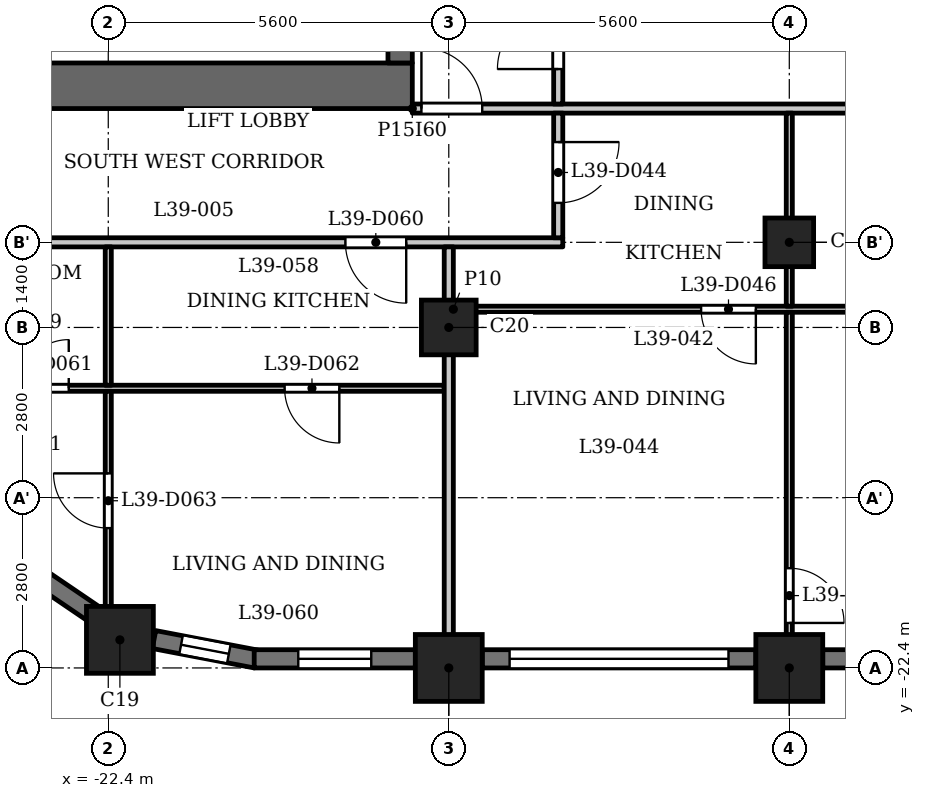
"""IFC4 building model, lengths in metres.
Left out: names, types, materials, properties, quantities, classifications, styles, units other than length and angle.
Written with IfcOpenShell. Run it as: python <this file> out.ifc"""

import sys

from ifc_helpers import new_model, si_unit, direction, frame, frame_2d, origin, origin_2d, place, context, subcontext, project, spatial, rectangle, extrude, element, fill, save


model = new_model("IFC4")
c1 = context("Model", 3, precision=1e-05, world=origin(), true_north=direction((0.0, 1.0)))
c2 = subcontext(c1, "Body", "Model", "MODEL_VIEW")
j1 = project(units=[si_unit("LENGTHUNIT", "METRE"), si_unit("PLANEANGLEUNIT", "RADIAN")], contexts=[c1])
p1 = place(None, origin())
s1 = spatial("IfcSite", under=j1, at=p1, CompositionType="ELEMENT")
p2 = place(p1, origin())
s2 = spatial("IfcBuilding", under=s1, at=p2, CompositionType="ELEMENT")
p3 = place(p2, frame((0.0, 0.0, 153.6)))
s3 = spatial("IfcBuildingStorey", under=s2, at=p3, CompositionType="ELEMENT", Elevation=153.6)
for number, where, z_axis, x_axis in (
    (1, (-22.209, -21.938, 0.0), (0.0, 0.0, 1.0), (1.0, 0.0, 0.0)),
    (2, (-16.8, -22.4, 0.0), (0.0, 0.0, 1.0), (1.0, 0.0, 0.0)),
    (3, (-11.2, -22.4, 0.0), (0.0, 0.0, 1.0), (1.0, 0.0, 0.0)),
):
    element("IfcColumn", number, at=place(p3, frame(where, z_axis=z_axis, x_axis=x_axis)), inside=s3, PredefinedType="COLUMN", context=c2, shape_type="SweptSolid", body=[
        extrude(rectangle(XDim=1.1, YDim=1.1, at=origin_2d()), origin(), (0.0, 0.0, 1.0), 3.5),
    ])
p4 = place(p3, frame((-16.8, -16.8, 0.0), z_axis=(0.0, 0.0, 1.0), x_axis=(1.0, 0.0, 0.0)))
e4 = element("IfcColumn", 4, at=p4, inside=s3, PredefinedType="COLUMN", context=c2, shape_type="SweptSolid", body=[
    extrude(rectangle(XDim=0.9, YDim=0.9, at=origin_2d()), origin(), (0.0, 0.0, 1.0), 3.5),
])
p5 = place(p3, frame((-11.2, -15.4, 0.0), z_axis=(0.0, 0.0, 1.0), x_axis=(1.0, 0.0, 0.0)))
e5 = element("IfcColumn", 5, at=p5, inside=s3, PredefinedType="COLUMN", context=c2, shape_type="SweptSolid", body=[
    extrude(rectangle(XDim=0.8, YDim=0.8, at=origin_2d()), origin(), (0.0, 0.0, 1.0), 3.5),
])
p6 = place(p3, frame((-23.492, -20.932, 0.0), z_axis=(0.0, 0.0, 1.0), x_axis=(0.826993959827, -0.562210806023, 0.0)))
e6 = element("IfcWall", 6, at=p6, inside=s3, PredefinedType="SOLIDWALL", context=c2, shape_type="SweptSolid", body=[
    extrude(rectangle(XDim=1.077, YDim=0.3, at=frame_2d((0.539, 0.0))), origin(), (0.0, 0.0, 1.0), 3.2),
])
p7 = place(p3, frame((-21.648, -21.933, 0.0), z_axis=(0.0, 0.0, 1.0), x_axis=(0.982297206936, -0.187329114784, 0.0)))
e7 = element("IfcWall", 7, at=p7, inside=s3, PredefinedType="SOLIDWALL", context=c2, shape_type="SweptSolid", body=[
    extrude(rectangle(XDim=1.706, YDim=0.3, at=frame_2d((0.853, 0.0))), origin(), (0.0, 0.0, 1.0), 2.45),
])
p8 = place(p7, frame((0.453, 0.0, 0.6)))
e8 = element("IfcOpeningElement", 8, at=p8, cuts=e7, PredefinedType="OPENING", context=c2, shape_type="SweptSolid", body=[
    extrude(rectangle(XDim=0.8, YDim=1.55, at=frame_2d((0.4, 0.775))), frame((0.0, 0.16, 0.0), z_axis=(0.0, -1.0, 0.0), x_axis=(1.0, 0.0, 0.0)), (0.0, 0.0, 1.0), 0.32),
])
p9 = place(p3, frame((-20.0, -22.25, 0.0), z_axis=(0.0, 0.0, 1.0), x_axis=(1.0, 0.0, 0.0)))
e9 = element("IfcWall", 9, at=p9, inside=s3, PredefinedType="SOLIDWALL", context=c2, shape_type="SweptSolid", body=[
    extrude(rectangle(XDim=2.65, YDim=0.3, at=frame_2d((1.325, 0.0))), origin(), (0.0, 0.0, 1.0), 2.45),
])
p10 = place(p9, frame((0.725, 0.0, 0.6)))
e10 = element("IfcOpeningElement", 10, at=p10, cuts=e9, PredefinedType="OPENING", context=c2, shape_type="SweptSolid", body=[
    extrude(rectangle(XDim=1.2, YDim=1.55, at=frame_2d((0.6, 0.775))), frame((0.0, 0.16, 0.0), z_axis=(0.0, -1.0, 0.0), x_axis=(1.0, 0.0, 0.0)), (0.0, 0.0, 1.0), 0.32),
])
p11 = place(p3, frame((-16.25, -22.25, 0.0), z_axis=(0.0, 0.0, 1.0), x_axis=(1.0, 0.0, 0.0)))
e11 = element("IfcWall", 11, at=p11, inside=s3, PredefinedType="SOLIDWALL", context=c2, shape_type="SweptSolid", body=[
    extrude(rectangle(XDim=4.5, YDim=0.3, at=frame_2d((2.25, 0.0))), origin(), (0.0, 0.0, 1.0), 2.45),
])
p12 = place(p11, frame((0.45, 0.0, 1.2)))
e12 = element("IfcOpeningElement", 12, at=p12, cuts=e11, PredefinedType="OPENING", context=c2, shape_type="SweptSolid", body=[
    extrude(rectangle(XDim=3.6, YDim=0.95, at=frame_2d((1.8, 0.475))), frame((0.0, 0.16, 0.0), z_axis=(0.0, -1.0, 0.0), x_axis=(1.0, 0.0, 0.0)), (0.0, 0.0, 1.0), 0.32),
])
p13 = place(p3, frame((-10.65, -22.25, 0.0), z_axis=(0.0, 0.0, 1.0), x_axis=(1.0, 0.0, 0.0)))
e13 = element("IfcWall", 13, at=p13, inside=s3, PredefinedType="SOLIDWALL", context=c2, shape_type="SweptSolid", body=[
    extrude(rectangle(XDim=4.5, YDim=0.3, at=frame_2d((2.25, 0.0))), origin(), (0.0, 0.0, 1.0), 2.45),
])
p14 = place(p13, frame((0.45, 0.0, 1.2)))
e14 = element("IfcOpeningElement", 14, at=p14, cuts=e13, PredefinedType="OPENING", context=c2, shape_type="SweptSolid", body=[
    extrude(rectangle(XDim=3.6, YDim=0.95, at=frame_2d((1.8, 0.475))), frame((0.0, 0.16, 0.0), z_axis=(0.0, -1.0, 0.0), x_axis=(1.0, 0.0, 0.0)), (0.0, 0.0, 1.0), 0.32),
])
p15 = place(p3, frame((-17.4, -12.825, 0.0), z_axis=(0.0, 0.0, 1.0), x_axis=(-1.0, 0.0, 0.0)))
e15 = element("IfcWall", 15, at=p15, inside=s3, PredefinedType="SHEAR", context=c2, shape_type="SweptSolid", body=[
    extrude(rectangle(XDim=10.4, YDim=0.75, at=frame_2d((5.2, 0.0))), origin(), (0.0, 0.0, 1.0), 3.2),
])
p16 = place(p3, frame((-17.6, -12.45, 0.0), z_axis=(0.0, 0.0, 1.0), x_axis=(0.0, 1.0, 0.0)))
e16 = element("IfcWall", 16, at=p16, inside=s3, PredefinedType="SHEAR", context=c2, shape_type="SweptSolid", body=[
    extrude(rectangle(XDim=24.9, YDim=0.4, at=frame_2d((12.45, 0.0))), origin(), (0.0, 0.0, 1.0), 3.2),
])
p17 = place(p16, frame((6.325, 0.0, 0.0)))
e17 = element("IfcOpeningElement", 17, at=p17, cuts=e16, PredefinedType="OPENING", context=c2, shape_type="SweptSolid", body=[
    extrude(rectangle(XDim=0.9, YDim=2.1, at=frame_2d((0.45, 1.05))), frame((0.0, 0.21, 0.0), z_axis=(0.0, -1.0, 0.0), x_axis=(1.0, 0.0, 0.0)), (0.0, 0.0, 1.0), 0.42),
])
p18 = place(p16, frame((9.925, 0.0, 0.0)))
e18 = element("IfcOpeningElement", 18, at=p18, cuts=e16, PredefinedType="OPENING", context=c2, shape_type="SweptSolid", body=[
    extrude(rectangle(XDim=0.9, YDim=2.1, at=frame_2d((0.45, 1.05))), frame((0.0, 0.21, 0.0), z_axis=(0.0, -1.0, 0.0), x_axis=(1.0, 0.0, 0.0)), (0.0, 0.0, 1.0), 0.42),
])
p19 = place(p16, frame((15.6, 0.0, 0.0)))
e19 = element("IfcOpeningElement", 19, at=p19, cuts=e16, PredefinedType="OPENING", context=c2, shape_type="SweptSolid", body=[
    extrude(rectangle(XDim=1.1, YDim=2.1, at=frame_2d((0.55, 1.05))), frame((0.0, 0.21, 0.0), z_axis=(0.0, -1.0, 0.0), x_axis=(1.0, 0.0, 0.0)), (0.0, 0.0, 1.0), 0.42),
])
p20 = place(p16, frame((18.0, 0.0, 0.0)))
e20 = element("IfcOpeningElement", 20, at=p20, cuts=e16, PredefinedType="OPENING", context=c2, shape_type="SweptSolid", body=[
    extrude(rectangle(XDim=1.1, YDim=2.1, at=frame_2d((0.55, 1.05))), frame((0.0, 0.21, 0.0), z_axis=(0.0, -1.0, 0.0), x_axis=(1.0, 0.0, 0.0)), (0.0, 0.0, 1.0), 0.42),
])
p21 = place(p16, frame((23.025, 0.0, 0.0)))
e21 = element("IfcOpeningElement", 21, at=p21, cuts=e16, PredefinedType="OPENING", context=c2, shape_type="SweptSolid", body=[
    extrude(rectangle(XDim=1.1, YDim=2.1, at=frame_2d((0.55, 1.05))), frame((0.0, 0.21, 0.0), z_axis=(0.0, -1.0, 0.0), x_axis=(1.0, 0.0, 0.0)), (0.0, 0.0, 1.0), 0.42),
])
p22 = place(p16, frame((0.775, 0.0, 0.0)))
e22 = element("IfcOpeningElement", 22, at=p22, cuts=e16, PredefinedType="OPENING", context=c2, shape_type="SweptSolid", body=[
    extrude(rectangle(XDim=1.1, YDim=2.1, at=frame_2d((0.55, 1.05))), frame((0.0, 0.21, 0.0), z_axis=(0.0, -1.0, 0.0), x_axis=(1.0, 0.0, 0.0)), (0.0, 0.0, 1.0), 0.42),
])
p23 = place(p16, frame((12.925, 0.0, 0.0)))
e23 = element("IfcOpeningElement", 23, at=p23, cuts=e16, PredefinedType="OPENING", context=c2, shape_type="SweptSolid", body=[
    extrude(rectangle(XDim=1.8, YDim=2.1, at=frame_2d((0.9, 1.05))), frame((0.0, 0.21, 0.0), z_axis=(0.0, -1.0, 0.0), x_axis=(1.0, 0.0, 0.0)), (0.0, 0.0, 1.0), 0.42),
])
p24 = place(p3, frame((-26.394, -17.8, 0.0), z_axis=(0.0, 0.0, 1.0), x_axis=(1.0, 0.0, 0.0)))
e24 = element("IfcWall", 24, at=p24, inside=s3, PredefinedType="PARTITIONING", context=c2, shape_type="SweptSolid", body=[
    extrude(rectangle(XDim=9.519, YDim=0.1, at=frame_2d((4.76, 0.0))), origin(), (0.0, 0.0, 1.0), 3.2),
])
p25 = place(p24, frame((2.544, 0.0, 0.0)))
e25 = element("IfcOpeningElement", 25, at=p25, cuts=e24, PredefinedType="OPENING", context=c2, shape_type="SweptSolid", body=[
    extrude(rectangle(XDim=0.8, YDim=2.1, at=frame_2d((0.4, 1.05))), frame((0.0, 0.06, 0.0), z_axis=(0.0, -1.0, 0.0), x_axis=(1.0, 0.0, 0.0)), (0.0, 0.0, 1.0), 0.12),
])
p26 = place(p24, frame((6.894, 0.0, 0.0)))
e26 = element("IfcOpeningElement", 26, at=p26, cuts=e24, PredefinedType="OPENING", context=c2, shape_type="SweptSolid", body=[
    extrude(rectangle(XDim=0.9, YDim=2.1, at=frame_2d((0.45, 1.05))), frame((0.0, 0.06, 0.0), z_axis=(0.0, -1.0, 0.0), x_axis=(1.0, 0.0, 0.0)), (0.0, 0.0, 1.0), 0.12),
])
p27 = place(p3, frame((-16.725, -16.5, 0.0), z_axis=(0.0, 0.0, 1.0), x_axis=(1.0, 0.0, 0.0)))
e27 = element("IfcWall", 27, at=p27, inside=s3, PredefinedType="PARTITIONING", context=c2, shape_type="SweptSolid", body=[
    extrude(rectangle(XDim=33.45, YDim=0.1, at=frame_2d((16.725, 0.0))), origin(), (0.0, 0.0, 1.0), 3.2),
])
p28 = place(p27, frame((9.675, 0.0, 0.0)))
e28 = element("IfcOpeningElement", 28, at=p28, cuts=e27, PredefinedType="OPENING", context=c2, shape_type="SweptSolid", body=[
    extrude(rectangle(XDim=0.8, YDim=2.1, at=frame_2d((0.4, 1.05))), frame((0.0, 0.06, 0.0), z_axis=(0.0, -1.0, 0.0), x_axis=(1.0, 0.0, 0.0)), (0.0, 0.0, 1.0), 0.12),
])
p29 = place(p27, frame((4.075, 0.0, 0.0)))
e29 = element("IfcOpeningElement", 29, at=p29, cuts=e27, PredefinedType="OPENING", context=c2, shape_type="SweptSolid", body=[
    extrude(rectangle(XDim=0.9, YDim=2.1, at=frame_2d((0.45, 1.05))), frame((0.0, 0.06, 0.0), z_axis=(0.0, -1.0, 0.0), x_axis=(1.0, 0.0, 0.0)), (0.0, 0.0, 1.0), 0.12),
])
p30 = place(p27, frame((20.875, 0.0, 0.0)))
e30 = element("IfcOpeningElement", 30, at=p30, cuts=e27, PredefinedType="OPENING", context=c2, shape_type="SweptSolid", body=[
    extrude(rectangle(XDim=0.8, YDim=2.1, at=frame_2d((0.4, 1.05))), frame((0.0, 0.06, 0.0), z_axis=(0.0, -1.0, 0.0), x_axis=(1.0, 0.0, 0.0)), (0.0, 0.0, 1.0), 0.12),
])
p31 = place(p27, frame((15.275, 0.0, 0.0)))
e31 = element("IfcOpeningElement", 31, at=p31, cuts=e27, PredefinedType="OPENING", context=c2, shape_type="SweptSolid", body=[
    extrude(rectangle(XDim=0.9, YDim=2.1, at=frame_2d((0.45, 1.05))), frame((0.0, 0.06, 0.0), z_axis=(0.0, -1.0, 0.0), x_axis=(1.0, 0.0, 0.0)), (0.0, 0.0, 1.0), 0.12),
])
p32 = place(p27, frame((26.475, 0.0, 0.0)))
e32 = element("IfcOpeningElement", 32, at=p32, cuts=e27, PredefinedType="OPENING", context=c2, shape_type="SweptSolid", body=[
    extrude(rectangle(XDim=0.8, YDim=2.1, at=frame_2d((0.4, 1.05))), frame((0.0, 0.06, 0.0), z_axis=(0.0, -1.0, 0.0), x_axis=(1.0, 0.0, 0.0)), (0.0, 0.0, 1.0), 0.12),
])
p33 = place(p27, frame((30.575, 0.0, 0.0)))
e33 = element("IfcOpeningElement", 33, at=p33, cuts=e27, PredefinedType="OPENING", context=c2, shape_type="SweptSolid", body=[
    extrude(rectangle(XDim=0.9, YDim=2.1, at=frame_2d((0.45, 1.05))), frame((0.0, 0.06, 0.0), z_axis=(0.0, -1.0, 0.0), x_axis=(1.0, 0.0, 0.0)), (0.0, 0.0, 1.0), 0.12),
])
p34 = place(p3, frame((-27.484, -15.4, 0.0), z_axis=(0.0, 0.0, 1.0), x_axis=(1.0, 0.0, 0.0)))
e34 = element("IfcWall", 34, at=p34, inside=s3, PredefinedType="PARTITIONING", context=c2, shape_type="SweptSolid", body=[
    extrude(rectangle(XDim=12.559, YDim=0.15, at=frame_2d((6.279, 0.0))), origin(), (0.0, 0.0, 1.0), 3.2),
])
p35 = place(p34, frame((8.984, 0.0, 0.0)))
e35 = element("IfcOpeningElement", 35, at=p35, cuts=e34, PredefinedType="OPENING", context=c2, shape_type="SweptSolid", body=[
    extrude(rectangle(XDim=1.0, YDim=2.1, at=frame_2d((0.5, 1.05))), frame((0.0, 0.085, 0.0), z_axis=(0.0, -1.0, 0.0), x_axis=(1.0, 0.0, 0.0)), (0.0, 0.0, 1.0), 0.17),
])
p36 = place(p3, frame((-17.4, -13.2, 0.0), z_axis=(0.0, 0.0, 1.0), x_axis=(1.0, 0.0, 0.0)))
e36 = element("IfcWall", 36, at=p36, inside=s3, PredefinedType="PARTITIONING", context=c2, shape_type="SweptSolid", body=[
    extrude(rectangle(XDim=34.8, YDim=0.15, at=frame_2d((17.4, 0.0))), origin(), (0.0, 0.0, 1.0), 3.2),
])
p37 = place(p36, frame((0.15, 0.0, 0.0)))
e37 = element("IfcOpeningElement", 37, at=p37, cuts=e36, PredefinedType="OPENING", context=c2, shape_type="SweptSolid", body=[
    extrude(rectangle(XDim=1.0, YDim=2.1, at=frame_2d((0.5, 1.05))), frame((0.0, 0.085, 0.0), z_axis=(0.0, -1.0, 0.0), x_axis=(1.0, 0.0, 0.0)), (0.0, 0.0, 1.0), 0.17),
])
p38 = place(p36, frame((33.55, 0.0, 0.0)))
e38 = element("IfcOpeningElement", 38, at=p38, cuts=e36, PredefinedType="OPENING", context=c2, shape_type="SweptSolid", body=[
    extrude(rectangle(XDim=1.0, YDim=2.1, at=frame_2d((0.5, 1.05))), frame((0.0, 0.085, 0.0), z_axis=(0.0, -1.0, 0.0), x_axis=(1.0, 0.0, 0.0)), (0.0, 0.0, 1.0), 0.17),
])
p39 = place(p36, frame((15.7, 0.0, 0.0)))
e39 = element("IfcOpeningElement", 39, at=p39, cuts=e36, PredefinedType="OPENING", context=c2, shape_type="SweptSolid", body=[
    extrude(rectangle(XDim=1.0, YDim=2.1, at=frame_2d((0.5, 1.05))), frame((0.0, 0.085, 0.0), z_axis=(0.0, -1.0, 0.0), x_axis=(1.0, 0.0, 0.0)), (0.0, 0.0, 1.0), 0.17),
])
p40 = place(p3, frame((-22.4, -21.72, 0.0), z_axis=(0.0, 0.0, 1.0), x_axis=(0.0, 1.0, 0.0)))
e40 = element("IfcWall", 40, at=p40, inside=s3, PredefinedType="PARTITIONING", context=c2, shape_type="SweptSolid", body=[
    extrude(rectangle(XDim=3.87, YDim=0.1, at=frame_2d((1.935, 0.0))), origin(), (0.0, 0.0, 1.0), 3.2),
])
p41 = place(p40, frame((1.62, 0.0, 0.0)))
e41 = element("IfcOpeningElement", 41, at=p41, cuts=e40, PredefinedType="OPENING", context=c2, shape_type="SweptSolid", body=[
    extrude(rectangle(XDim=0.9, YDim=2.1, at=frame_2d((0.45, 1.05))), frame((0.0, 0.06, 0.0), z_axis=(0.0, -1.0, 0.0), x_axis=(1.0, 0.0, 0.0)), (0.0, 0.0, 1.0), 0.12),
])
p42 = place(p3, frame((-22.4, -17.75, 0.0), z_axis=(0.0, 0.0, 1.0), x_axis=(0.0, 1.0, 0.0)))
e42 = element("IfcWall", 42, at=p42, inside=s3, PredefinedType="PARTITIONING", context=c2, shape_type="SweptSolid", body=[
    extrude(rectangle(XDim=2.275, YDim=0.1, at=frame_2d((1.137, 0.0))), origin(), (0.0, 0.0, 1.0), 3.2),
])
p43 = place(p3, frame((-16.8, -22.93, 0.0), z_axis=(0.0, 0.0, 1.0), x_axis=(0.0, 1.0, 0.0)))
e43 = element("IfcWall", 43, at=p43, inside=s3, PredefinedType="PARTITIONING", context=c2, shape_type="SweptSolid", body=[
    extrude(rectangle(XDim=7.455, YDim=0.15, at=frame_2d((3.728, 0.0))), origin(), (0.0, 0.0, 1.0), 3.2),
])
p44 = place(p3, frame((-15.0, -15.325, 0.0), z_axis=(0.0, 0.0, 1.0), x_axis=(0.0, 1.0, 0.0)))
e44 = element("IfcWall", 44, at=p44, inside=s3, PredefinedType="PARTITIONING", context=c2, shape_type="SweptSolid", body=[
    extrude(rectangle(XDim=2.05, YDim=0.15, at=frame_2d((1.025, 0.0))), origin(), (0.0, 0.0, 1.0), 3.2),
])
p45 = place(p44, frame((0.574, 0.0, 0.0)))
e45 = element("IfcOpeningElement", 45, at=p45, cuts=e44, PredefinedType="OPENING", context=c2, shape_type="SweptSolid", body=[
    extrude(rectangle(XDim=1.0, YDim=2.1, at=frame_2d((0.5, 1.05))), frame((0.0, 0.085, 0.0), z_axis=(0.0, -1.0, 0.0), x_axis=(1.0, 0.0, 0.0)), (0.0, 0.0, 1.0), 0.17),
])
p46 = place(p3, frame((-15.0, -13.125, 0.0), z_axis=(0.0, 0.0, 1.0), x_axis=(0.0, 1.0, 0.0)))
e46 = element("IfcWall", 46, at=p46, inside=s3, PredefinedType="PARTITIONING", context=c2, shape_type="SweptSolid", body=[
    extrude(rectangle(XDim=6.356, YDim=0.15, at=frame_2d((3.178, 0.0))), origin(), (0.0, 0.0, 1.0), 3.2),
])
p47 = place(p46, frame((0.575, 0.0, 0.0)))
e47 = element("IfcOpeningElement", 47, at=p47, cuts=e46, PredefinedType="OPENING", context=c2, shape_type="SweptSolid", body=[
    extrude(rectangle(XDim=1.0, YDim=2.1, at=frame_2d((0.5, 1.05))), frame((0.0, 0.085, 0.0), z_axis=(0.0, -1.0, 0.0), x_axis=(1.0, 0.0, 0.0)), (0.0, 0.0, 1.0), 0.17),
])
p48 = place(p3, frame((-11.2, -22.93, 0.0), z_axis=(0.0, 0.0, 1.0), x_axis=(0.0, 1.0, 0.0)))
e48 = element("IfcWall", 48, at=p48, inside=s3, PredefinedType="PARTITIONING", context=c2, shape_type="SweptSolid", body=[
    extrude(rectangle(XDim=6.38, YDim=0.1, at=frame_2d((3.19, 0.0))), origin(), (0.0, 0.0, 1.0), 3.2),
])
p49 = place(p48, frame((1.27, 0.0, 0.0)))
e49 = element("IfcOpeningElement", 49, at=p49, cuts=e48, PredefinedType="OPENING", context=c2, shape_type="SweptSolid", body=[
    extrude(rectangle(XDim=0.9, YDim=2.1, at=frame_2d((0.45, 1.05))), frame((0.0, 0.06, 0.0), z_axis=(0.0, -1.0, 0.0), x_axis=(1.0, 0.0, 0.0)), (0.0, 0.0, 1.0), 0.12),
])
p50 = place(p3, frame((-11.2, -16.45, 0.0), z_axis=(0.0, 0.0, 1.0), x_axis=(0.0, 1.0, 0.0)))
e50 = element("IfcWall", 50, at=p50, inside=s3, PredefinedType="PARTITIONING", context=c2, shape_type="SweptSolid", body=[
    extrude(rectangle(XDim=3.175, YDim=0.1, at=frame_2d((1.587, 0.0))), origin(), (0.0, 0.0, 1.0), 3.2),
])
p51 = place(p47, origin())
e51 = element("IfcDoor", 51, at=p51, inside=s3, OperationType="SINGLE_SWING_RIGHT", PredefinedType="DOOR", context=c2, shape_type="SweptSolid", body=[
    extrude(rectangle(XDim=1.0, YDim=2.1, at=frame_2d((0.5, 1.05))), frame((0.0, 0.025, 0.0), z_axis=(0.0, -1.0, 0.0), x_axis=(1.0, 0.0, 0.0)), (0.0, 0.0, 1.0), 0.05),
])
fill(e47, e51)
p52 = place(p37, origin())
e52 = element("IfcDoor", 52, at=p52, inside=s3, OperationType="SINGLE_SWING_RIGHT", PredefinedType="DOOR", context=c2, shape_type="SweptSolid", body=[
    extrude(rectangle(XDim=1.0, YDim=2.1, at=frame_2d((0.5, 1.05))), frame((0.0, 0.025, 0.0), z_axis=(0.0, -1.0, 0.0), x_axis=(1.0, 0.0, 0.0)), (0.0, 0.0, 1.0), 0.05),
])
fill(e37, e52)
p53 = place(p45, origin())
e53 = element("IfcDoor", 53, at=p53, inside=s3, OperationType="SINGLE_SWING_RIGHT", PredefinedType="DOOR", context=c2, shape_type="SweptSolid", body=[
    extrude(rectangle(XDim=1.0, YDim=2.1, at=frame_2d((0.5, 1.05))), frame((0.0, 0.025, 0.0), z_axis=(0.0, -1.0, 0.0), x_axis=(1.0, 0.0, 0.0)), (0.0, 0.0, 1.0), 0.05),
])
fill(e45, e53)
p54 = place(p29, origin())
e54 = element("IfcDoor", 54, at=p54, inside=s3, OperationType="SINGLE_SWING_RIGHT", PredefinedType="DOOR", context=c2, shape_type="SweptSolid", body=[
    extrude(rectangle(XDim=0.9, YDim=2.1, at=frame_2d((0.45, 1.05))), frame((0.0, 0.025, 0.0), z_axis=(0.0, -1.0, 0.0), x_axis=(1.0, 0.0, 0.0)), (0.0, 0.0, 1.0), 0.05),
])
fill(e29, e54)
p55 = place(p49, origin())
e55 = element("IfcDoor", 55, at=p55, inside=s3, OperationType="SINGLE_SWING_LEFT", PredefinedType="DOOR", context=c2, shape_type="SweptSolid", body=[
    extrude(rectangle(XDim=0.9, YDim=2.1, at=frame_2d((0.45, 1.05))), frame((0.0, 0.025, 0.0), z_axis=(0.0, -1.0, 0.0), x_axis=(1.0, 0.0, 0.0)), (0.0, 0.0, 1.0), 0.05),
])
fill(e49, e55)
p56 = place(p35, origin())
e56 = element("IfcDoor", 56, at=p56, inside=s3, OperationType="SINGLE_SWING_RIGHT", PredefinedType="DOOR", context=c2, shape_type="SweptSolid", body=[
    extrude(rectangle(XDim=1.0, YDim=2.1, at=frame_2d((0.5, 1.05))), frame((0.0, 0.025, 0.0), z_axis=(0.0, -1.0, 0.0), x_axis=(1.0, 0.0, 0.0)), (0.0, 0.0, 1.0), 0.05),
])
fill(e35, e56)
p57 = place(p25, origin())
e57 = element("IfcDoor", 57, at=p57, inside=s3, OperationType="SINGLE_SWING_LEFT", PredefinedType="DOOR", context=c2, shape_type="SweptSolid", body=[
    extrude(rectangle(XDim=0.8, YDim=2.1, at=frame_2d((0.4, 1.05))), frame((0.0, 0.025, 0.0), z_axis=(0.0, -1.0, 0.0), x_axis=(1.0, 0.0, 0.0)), (0.0, 0.0, 1.0), 0.05),
])
fill(e25, e57)
p58 = place(p26, origin())
e58 = element("IfcDoor", 58, at=p58, inside=s3, OperationType="SINGLE_SWING_RIGHT", PredefinedType="DOOR", context=c2, shape_type="SweptSolid", body=[
    extrude(rectangle(XDim=0.9, YDim=2.1, at=frame_2d((0.45, 1.05))), frame((0.0, 0.025, 0.0), z_axis=(0.0, -1.0, 0.0), x_axis=(1.0, 0.0, 0.0)), (0.0, 0.0, 1.0), 0.05),
])
fill(e26, e58)
p59 = place(p41, origin())
e59 = element("IfcDoor", 59, at=p59, inside=s3, OperationType="SINGLE_SWING_LEFT", PredefinedType="DOOR", context=c2, shape_type="SweptSolid", body=[
    extrude(rectangle(XDim=0.9, YDim=2.1, at=frame_2d((0.45, 1.05))), frame((0.0, 0.025, 0.0), z_axis=(0.0, -1.0, 0.0), x_axis=(1.0, 0.0, 0.0)), (0.0, 0.0, 1.0), 0.05),
])
fill(e41, e59)
p60 = place(p8, origin())
e60 = element("IfcWindow", 60, at=p60, inside=s3, PartitioningType="SINGLE_PANEL", PredefinedType="WINDOW", context=c2, shape_type="SweptSolid", body=[
    extrude(rectangle(XDim=0.8, YDim=1.55, at=frame_2d((0.4, 0.775))), frame((0.0, 0.03, 0.0), z_axis=(0.0, -1.0, 0.0), x_axis=(1.0, 0.0, 0.0)), (0.0, 0.0, 1.0), 0.06),
])
fill(e8, e60)
p61 = place(p10, origin())
e61 = element("IfcWindow", 61, at=p61, inside=s3, PartitioningType="SINGLE_PANEL", PredefinedType="WINDOW", context=c2, shape_type="SweptSolid", body=[
    extrude(rectangle(XDim=1.2, YDim=1.55, at=frame_2d((0.6, 0.775))), frame((0.0, 0.03, 0.0), z_axis=(0.0, -1.0, 0.0), x_axis=(1.0, 0.0, 0.0)), (0.0, 0.0, 1.0), 0.06),
])
fill(e10, e61)
p62 = place(p12, origin())
e62 = element("IfcWindow", 62, at=p62, inside=s3, PartitioningType="SINGLE_PANEL", PredefinedType="WINDOW", context=c2, shape_type="SweptSolid", body=[
    extrude(rectangle(XDim=3.6, YDim=0.95, at=frame_2d((1.8, 0.475))), frame((0.0, 0.03, 0.0), z_axis=(0.0, -1.0, 0.0), x_axis=(1.0, 0.0, 0.0)), (0.0, 0.0, 1.0), 0.06),
])
fill(e12, e62)
save(model, sys.argv[1])
